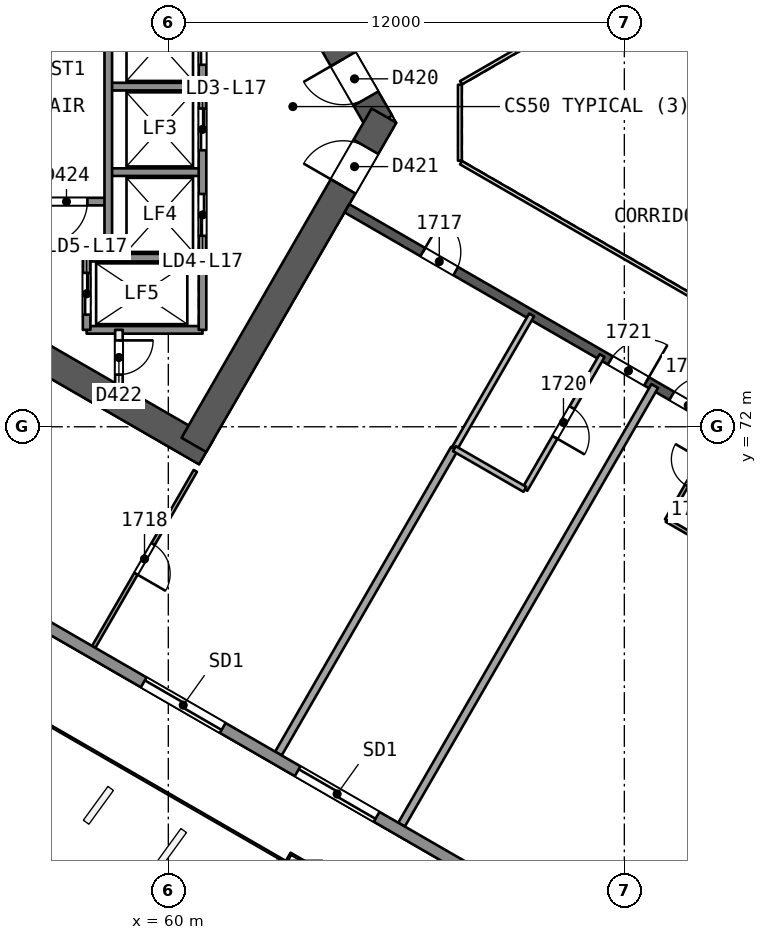
"""IFC4 building model, lengths in metres.
Left out: names, types, materials, properties, quantities, classifications, styles, units other than length and angle.
Written with IfcOpenShell. Run it as: python <this file> out.ifc"""

import sys

from ifc_helpers import new_model, si_unit, direction, frame, frame_2d, origin, origin_2d, place, context, subcontext, project, spatial, rectangle, extrude, element, fill, save


model = new_model("IFC4")
c1 = context("Model", 3, precision=1e-05, world=origin(), true_north=direction((0.0, 1.0)))
c2 = subcontext(c1, "Body", "Model", "MODEL_VIEW")
j1 = project(units=[si_unit("LENGTHUNIT", "METRE"), si_unit("PLANEANGLEUNIT", "RADIAN")], contexts=[c1])
p1 = place(None, origin())
s1 = spatial("IfcSite", under=j1, at=p1, CompositionType="ELEMENT")
p2 = place(p1, origin())
s2 = spatial("IfcBuilding", under=s1, at=p2, CompositionType="ELEMENT")
p3 = place(p2, frame((0.0, 0.0, 75.8)))
s3 = spatial("IfcBuildingStorey", under=s2, at=p3, CompositionType="ELEMENT", Elevation=75.8)
p4 = place(p3, frame((65.567, 80.0, 0.0), z_axis=(0.0, 0.0, 1.0), x_axis=(-0.499988615364, 0.866031976607, 0.0)))
e1 = element("IfcWall", 1, at=p4, inside=s3, PredefinedType="SHEAR", context=c2, shape_type="SweptSolid", body=[
    extrude(rectangle(XDim=10.163, YDim=0.75, at=frame_2d((5.082, 0.0))), origin(), (0.0, 0.0, 1.0), 3.7),
])
p5 = place(p4, frame((0.733, 0.0, 0.0)))
e2 = element("IfcOpeningElement", 2, at=p5, cuts=e1, PredefinedType="OPENING", context=c2, shape_type="SweptSolid", body=[
    extrude(rectangle(XDim=1.2, YDim=2.1, at=frame_2d((0.6, 1.05))), frame((0.0, 0.385, 0.0), z_axis=(0.0, -1.0, 0.0), x_axis=(1.0, 0.0, 0.0)), (0.0, 0.0, 1.0), 0.771),
])
p6 = place(p3, frame((60.673, 88.477, 0.0), z_axis=(0.0, 0.0, 1.0), x_axis=(-0.8660248072, -0.500001033313, 0.0)))
e3 = element("IfcWall", 3, at=p6, inside=s3, PredefinedType="SHEAR", context=c2, shape_type="SweptSolid", body=[
    extrude(rectangle(XDim=13.958, YDim=0.75, at=frame_2d((6.979, 0.0))), origin(), (0.0, 0.0, 1.0), 3.7),
])
p7 = place(p3, frame((48.772, 78.394, 0.0), z_axis=(0.0, 0.0, 1.0), x_axis=(0.866028339916, -0.499994914436, 0.0)))
e4 = element("IfcWall", 4, at=p7, inside=s3, PredefinedType="SHEAR", context=c2, shape_type="SweptSolid", body=[
    extrude(rectangle(XDim=14.117, YDim=0.75, at=frame_2d((7.059, 0.0))), origin(), (0.0, 0.0, 1.0), 3.7),
])
p8 = place(p3, frame((60.673, 71.523, 0.0), z_axis=(0.0, 0.0, 1.0), x_axis=(0.499997052475, 0.866027105532, 0.0)))
e5 = element("IfcWall", 5, at=p8, inside=s3, PredefinedType="SHEAR", context=c2, shape_type="SweptSolid", body=[
    extrude(rectangle(XDim=10.005, YDim=0.75, at=frame_2d((5.002, 0.0))), origin(), (0.0, 0.0, 1.0), 3.7),
])
p9 = place(p8, frame((7.855, 0.0, 0.0)))
e6 = element("IfcOpeningElement", 6, at=p9, cuts=e5, PredefinedType="OPENING", context=c2, shape_type="SweptSolid", body=[
    extrude(rectangle(XDim=1.2, YDim=2.1, at=frame_2d((0.6, 1.05))), frame((0.0, 0.385, 0.0), z_axis=(0.0, -1.0, 0.0), x_axis=(1.0, 0.0, 0.0)), (0.0, 0.0, 1.0), 0.771),
])
p10 = place(p3, frame((64.7, 77.748, 0.0), z_axis=(0.0, 0.0, 1.0), x_axis=(0.866026492143, -0.499998114903, 0.0)))
e7 = element("IfcWall", 7, at=p10, inside=s3, PredefinedType="SHEAR", context=c2, shape_type="SweptSolid", body=[
    extrude(rectangle(XDim=15.588, YDim=0.25, at=frame_2d((7.794, 0.0))), origin(), (0.0, 0.0, 1.0), 3.2),
])
p11 = place(p10, frame((2.306, 0.0, 0.0)))
e8 = element("IfcOpeningElement", 8, at=p11, cuts=e7, PredefinedType="OPENING", context=c2, shape_type="SweptSolid", body=[
    extrude(rectangle(XDim=1.0, YDim=2.1, at=frame_2d((0.5, 1.05))), frame((0.0, 0.135, 0.0), z_axis=(0.0, -1.0, 0.0), x_axis=(1.0, 0.0, 0.0)), (0.0, 0.0, 1.0), 0.271),
])
p12 = place(p10, frame((8.003, 0.0, 0.0)))
e9 = element("IfcOpeningElement", 9, at=p12, cuts=e7, PredefinedType="OPENING", context=c2, shape_type="SweptSolid", body=[
    extrude(rectangle(XDim=1.1, YDim=2.1, at=frame_2d((0.55, 1.05))), frame((0.0, 0.135, 0.0), z_axis=(0.0, -1.0, 0.0), x_axis=(1.0, 0.0, 0.0)), (0.0, 0.0, 1.0), 0.271),
])
p13 = place(p10, frame((9.871, 0.0, 0.0)))
e10 = element("IfcOpeningElement", 10, at=p13, cuts=e7, PredefinedType="OPENING", context=c2, shape_type="SweptSolid", body=[
    extrude(rectangle(XDim=1.0, YDim=2.1, at=frame_2d((0.5, 1.05))), frame((0.0, 0.135, 0.0), z_axis=(0.0, -1.0, 0.0), x_axis=(1.0, 0.0, 0.0)), (0.0, 0.0, 1.0), 0.271),
])
p14 = place(p3, frame((63.437, 59.973, 0.0), z_axis=(0.010093620709, 0.017482414954, 0.999796221231), x_axis=(-0.866025993948, 0.499998977805, 1.48331e-07)))
e11 = element("IfcColumn", 11, at=p14, inside=s3, PredefinedType="COLUMN", context=c2, shape_type="SweptSolid", body=[
    extrude(rectangle(XDim=1.1, YDim=1.1, at=origin_2d()), origin(), (0.0, 0.0, 1.0), 3.701),
])
p15 = place(p3, frame((60.71, 70.838, 0.0), z_axis=(0.0, 0.0, 1.0), x_axis=(-0.499974070055, -0.866040373927, 0.0)))
e12 = element("IfcWall", 12, at=p15, inside=s3, PredefinedType="PARTITIONING", context=c2, shape_type="SweptSolid", body=[
    extrude(rectangle(XDim=5.347, YDim=0.1, at=frame_2d((2.674, 0.0))), origin(), (0.0, 0.0, 1.0), 3.2),
])
p16 = place(p15, frame((2.224, 0.0, 0.0)))
e13 = element("IfcOpeningElement", 13, at=p16, cuts=e12, PredefinedType="OPENING", context=c2, shape_type="SweptSolid", body=[
    extrude(rectangle(XDim=0.9, YDim=2.1, at=frame_2d((0.45, 1.05))), frame((0.0, 0.061, 0.0), z_axis=(0.0, -1.0, 0.0), x_axis=(1.0, 0.0, 0.0)), (0.0, 0.0, 1.0), 0.121),
])
p17 = place(p3, frame((62.897, 63.401, 0.0), z_axis=(0.0, 0.0, 1.0), x_axis=(0.500016752221, 0.866015731669, 0.0)))
e14 = element("IfcWall", 14, at=p17, inside=s3, PredefinedType="PARTITIONING", context=c2, shape_type="SweptSolid", body=[
    extrude(rectangle(XDim=9.263, YDim=0.2, at=frame_2d((4.632, 0.0))), origin(), (0.0, 0.0, 1.0), 3.2),
])
p18 = place(p3, frame((67.529, 71.424, 0.0), z_axis=(0.0, 0.0, 1.0), x_axis=(0.499984252764, 0.866034495264, 0.0)))
e15 = element("IfcWall", 15, at=p18, inside=s3, PredefinedType="PARTITIONING", context=c2, shape_type="SweptSolid", body=[
    extrude(rectangle(XDim=4.063, YDim=0.15, at=frame_2d((2.032, 0.0))), origin(), (0.0, 0.0, 1.0), 3.2),
])
p19 = place(p3, frame((71.414, 73.872, 0.0), z_axis=(0.0, 0.0, 1.0), x_axis=(-0.499984252764, -0.866034495264, 0.0)))
e16 = element("IfcWall", 16, at=p19, inside=s3, PredefinedType="PARTITIONING", context=c2, shape_type="SweptSolid", body=[
    extrude(rectangle(XDim=4.063, YDim=0.15, at=frame_2d((2.032, 0.0))), origin(), (0.0, 0.0, 1.0), 3.2),
])
p20 = place(p19, frame((1.582, 0.0, 0.0)))
e17 = element("IfcOpeningElement", 17, at=p20, cuts=e16, PredefinedType="OPENING", context=c2, shape_type="SweptSolid", body=[
    extrude(rectangle(XDim=0.9, YDim=2.1, at=frame_2d((0.45, 1.05))), frame((0.0, 0.085, 0.0), z_axis=(0.0, -1.0, 0.0), x_axis=(1.0, 0.0, 0.0)), (0.0, 0.0, 1.0), 0.171),
])
p21 = place(p3, frame((69.383, 70.353, 0.0), z_axis=(0.0, 0.0, 1.0), x_axis=(-0.866024183959, 0.500002112793, 0.0)))
e18 = element("IfcWall", 18, at=p21, inside=s3, PredefinedType="PARTITIONING", context=c2, shape_type="SweptSolid", body=[
    extrude(rectangle(XDim=2.141, YDim=0.15, at=frame_2d((1.071, 0.0))), origin(), (0.0, 0.0, 1.0), 3.2),
])
p22 = place(p3, frame((66.137, 61.531, 0.0), z_axis=(0.0, 0.0, 1.0), x_axis=(0.500006843521, 0.86602145264, 0.0)))
e19 = element("IfcWall", 19, at=p22, inside=s3, PredefinedType="PARTITIONING", context=c2, shape_type="SweptSolid", body=[
    extrude(rectangle(XDim=13.326, YDim=0.2, at=frame_2d((6.663, 0.0))), origin(), (0.0, 0.0, 1.0), 3.2),
])
p23 = place(p3, frame((74.498, 68.743, 0.0), z_axis=(0.0, 0.0, 1.0), x_axis=(-0.865989903783, 0.500061482766, 0.0)))
e20 = element("IfcWall", 20, at=p23, inside=s3, PredefinedType="PARTITIONING", context=c2, shape_type="SweptSolid", body=[
    extrude(rectangle(XDim=1.6, YDim=0.1, at=frame_2d((0.8, 0.0))), origin(), (0.0, 0.0, 1.0), 3.2),
])
p24 = place(p3, frame((73.113, 69.543, 0.0), z_axis=(0.0, 0.0, 1.0), x_axis=(0.499987231761, 0.866032775405, 0.0)))
e21 = element("IfcWall", 21, at=p24, inside=s3, PredefinedType="PARTITIONING", context=c2, shape_type="SweptSolid", body=[
    extrude(rectangle(XDim=2.9, YDim=0.1, at=frame_2d((1.45, 0.0))), origin(), (0.0, 0.0, 1.0), 3.2),
])
p25 = place(p24, frame((1.05, 0.0, 0.0)))
e22 = element("IfcOpeningElement", 22, at=p25, cuts=e21, PredefinedType="OPENING", context=c2, shape_type="SweptSolid", body=[
    extrude(rectangle(XDim=0.8, YDim=2.1, at=frame_2d((0.4, 1.05))), frame((0.0, 0.061, 0.0), z_axis=(0.0, -1.0, 0.0), x_axis=(1.0, 0.0, 0.0)), (0.0, 0.0, 1.0), 0.121),
])
p26 = place(p3, frame((90.332, 47.39, 0.0), z_axis=(0.0, 0.0, 1.0), x_axis=(-0.866024586246, 0.500001416016, 0.0)))
e23 = element("IfcWall", 23, at=p26, inside=s3, PredefinedType="SOLIDWALL", context=c2, shape_type="SweptSolid", body=[
    extrude(rectangle(XDim=59.166, YDim=0.3, at=frame_2d((29.583, 0.0))), origin(), (0.0, 0.0, 1.0), 3.2),
])
p27 = place(p26, frame((28.695, 0.0, 0.0)))
e24 = element("IfcOpeningElement", 24, at=p27, cuts=e23, PredefinedType="OPENING", context=c2, shape_type="SweptSolid", body=[
    extrude(rectangle(XDim=2.4, YDim=2.4, at=frame_2d((1.2, 1.2))), frame((0.0, 0.161, 0.0), z_axis=(0.0, -1.0, 0.0), x_axis=(1.0, 0.0, 0.0)), (0.0, 0.0, 1.0), 0.321),
])
p28 = place(p26, frame((33.372, 0.0, 0.0)))
e25 = element("IfcOpeningElement", 25, at=p28, cuts=e23, PredefinedType="OPENING", context=c2, shape_type="SweptSolid", body=[
    extrude(rectangle(XDim=2.4, YDim=2.4, at=frame_2d((1.2, 1.2))), frame((0.0, 0.161, 0.0), z_axis=(0.0, -1.0, 0.0), x_axis=(1.0, 0.0, 0.0)), (0.0, 0.0, 1.0), 0.321),
])
p29 = place(p26, frame((45.903, 0.0, 0.0)))
e26 = element("IfcOpeningElement", 26, at=p29, cuts=e23, PredefinedType="OPENING", context=c2, shape_type="SweptSolid", body=[
    extrude(rectangle(XDim=2.4, YDim=2.4, at=frame_2d((1.2, 1.2))), frame((0.0, 0.161, 0.0), z_axis=(0.0, -1.0, 0.0), x_axis=(1.0, 0.0, 0.0)), (0.0, 0.0, 1.0), 0.321),
])
p30 = place(p26, frame((12.769, 0.0, 0.0)))
e27 = element("IfcOpeningElement", 27, at=p30, cuts=e23, PredefinedType="OPENING", context=c2, shape_type="SweptSolid", body=[
    extrude(rectangle(XDim=2.4, YDim=2.4, at=frame_2d((1.2, 1.2))), frame((0.0, 0.161, 0.0), z_axis=(0.0, -1.0, 0.0), x_axis=(1.0, 0.0, 0.0)), (0.0, 0.0, 1.0), 0.321),
])
for number, where, z_axis, x_axis in (
    (28, (60.9, 80.95, 0.0), (0.0, 0.0, 1.0), (-1.0, 0.0, 0.0)),
    (29, (60.9, 78.7, 0.0), (0.0, 0.0, 1.0), (-1.0, 0.0, 0.0)),
):
    element("IfcWall", number, at=place(p3, frame(where, z_axis=z_axis, x_axis=x_axis)), inside=s3, PredefinedType="SOLIDWALL", context=c2, shape_type="SweptSolid", body=[
        extrude(rectangle(XDim=2.48, YDim=0.2, at=frame_2d((1.24, 0.0))), origin(), (0.0, 0.0, 1.0), 3.2),
    ])
p31 = place(p3, frame((58.42, 77.925, 0.0), z_axis=(0.0, 0.0, 1.0), x_axis=(-1.0, 0.0, 0.0)))
e30 = element("IfcWall", 30, at=p31, inside=s3, PredefinedType="SOLIDWALL", context=c2, shape_type="SweptSolid", body=[
    extrude(rectangle(XDim=7.7, YDim=0.2, at=frame_2d((3.85, 0.0))), origin(), (0.0, 0.0, 1.0), 3.2),
])
p32 = place(p31, frame((0.55, 0.0, 0.0)))
e31 = element("IfcOpeningElement", 31, at=p32, cuts=e30, PredefinedType="OPENING", context=c2, shape_type="SweptSolid", body=[
    extrude(rectangle(XDim=1.1, YDim=2.1, at=frame_2d((0.55, 1.05))), frame((0.0, 0.11, 0.0), z_axis=(0.0, -1.0, 0.0), x_axis=(1.0, 0.0, 0.0)), (0.0, 0.0, 1.0), 0.221),
])
for number, where, z_axis, x_axis in (
    (32, (60.9, 76.45, 0.0), (0.0, 0.0, 1.0), (-1.0, 0.0, 0.0)),
    (33, (60.9, 74.55, 0.0), (0.0, 0.0, 1.0), (-1.0, 0.0, 0.0)),
):
    element("IfcWall", number, at=place(p3, frame(where, z_axis=z_axis, x_axis=x_axis)), inside=s3, PredefinedType="SOLIDWALL", context=c2, shape_type="SweptSolid", body=[
        extrude(rectangle(XDim=3.05, YDim=0.2, at=frame_2d((1.525, 0.0))), origin(), (0.0, 0.0, 1.0), 3.2),
    ])
p33 = place(p3, frame((60.9, 85.45, 0.0), z_axis=(0.0, 0.0, 1.0), x_axis=(0.0, -1.0, 0.0)))
e34 = element("IfcWall", 34, at=p33, inside=s3, PredefinedType="SOLIDWALL", context=c2, shape_type="SweptSolid", body=[
    extrude(rectangle(XDim=10.9, YDim=0.2, at=frame_2d((5.45, 0.0))), origin(), (0.0, 0.0, 1.0), 3.2),
])
p34 = place(p33, frame((0.575, 0.0, 0.0)))
e35 = element("IfcOpeningElement", 35, at=p34, cuts=e34, PredefinedType="OPENING", context=c2, shape_type="SweptSolid", body=[
    extrude(rectangle(XDim=1.1, YDim=2.1, at=frame_2d((0.55, 1.05))), frame((0.0, 0.11, 0.0), z_axis=(0.0, -1.0, 0.0), x_axis=(1.0, 0.0, 0.0)), (0.0, 0.0, 1.0), 0.221),
])
p35 = place(p33, frame((2.825, 0.0, 0.0)))
e36 = element("IfcOpeningElement", 36, at=p35, cuts=e34, PredefinedType="OPENING", context=c2, shape_type="SweptSolid", body=[
    extrude(rectangle(XDim=1.1, YDim=2.1, at=frame_2d((0.55, 1.05))), frame((0.0, 0.11, 0.0), z_axis=(0.0, -1.0, 0.0), x_axis=(1.0, 0.0, 0.0)), (0.0, 0.0, 1.0), 0.221),
])
p36 = place(p33, frame((5.075, 0.0, 0.0)))
e37 = element("IfcOpeningElement", 37, at=p36, cuts=e34, PredefinedType="OPENING", context=c2, shape_type="SweptSolid", body=[
    extrude(rectangle(XDim=1.1, YDim=2.1, at=frame_2d((0.55, 1.05))), frame((0.0, 0.11, 0.0), z_axis=(0.0, -1.0, 0.0), x_axis=(1.0, 0.0, 0.0)), (0.0, 0.0, 1.0), 0.221),
])
p37 = place(p33, frame((7.325, 0.0, 0.0)))
e38 = element("IfcOpeningElement", 38, at=p37, cuts=e34, PredefinedType="OPENING", context=c2, shape_type="SweptSolid", body=[
    extrude(rectangle(XDim=1.1, YDim=2.1, at=frame_2d((0.55, 1.05))), frame((0.0, 0.11, 0.0), z_axis=(0.0, -1.0, 0.0), x_axis=(1.0, 0.0, 0.0)), (0.0, 0.0, 1.0), 0.221),
])
p38 = place(p3, frame((58.7, 74.55, 0.0), z_axis=(0.0, 0.0, 1.0), x_axis=(0.0, -1.0, 0.0)))
e39 = element("IfcWall", 39, at=p38, inside=s3, PredefinedType="PARTITIONING", context=c2, shape_type="SweptSolid", body=[
    extrude(rectangle(XDim=1.455, YDim=0.2, at=frame_2d((0.728, 0.0))), origin(), (0.0, 0.0, 1.0), 3.2),
])
p39 = place(p38, frame((0.278, 0.0, 0.0)))
e40 = element("IfcOpeningElement", 40, at=p39, cuts=e39, PredefinedType="OPENING", context=c2, shape_type="SweptSolid", body=[
    extrude(rectangle(XDim=0.9, YDim=2.1, at=frame_2d((0.45, 1.05))), frame((0.0, 0.11, 0.0), z_axis=(0.0, -1.0, 0.0), x_axis=(1.0, 0.0, 0.0)), (0.0, 0.0, 1.0), 0.221),
])
p40 = place(p3, frame((58.42, 85.45, 0.0), z_axis=(0.0, 0.0, 1.0), x_axis=(0.0, -1.0, 0.0)))
e41 = element("IfcWall", 41, at=p40, inside=s3, PredefinedType="SOLIDWALL", context=c2, shape_type="SweptSolid", body=[
    extrude(rectangle(XDim=9.0, YDim=0.2, at=frame_2d((4.5, 0.0))), origin(), (0.0, 0.0, 1.0), 3.2),
])
p41 = place(p3, frame((57.85, 76.45, 0.0), z_axis=(0.0, 0.0, 1.0), x_axis=(0.0, -1.0, 0.0)))
e42 = element("IfcWall", 42, at=p41, inside=s3, PredefinedType="SOLIDWALL", context=c2, shape_type="SweptSolid", body=[
    extrude(rectangle(XDim=1.9, YDim=0.2, at=frame_2d((0.95, 0.0))), origin(), (0.0, 0.0, 1.0), 3.2),
])
p42 = place(p41, frame((0.4, 0.0, 0.0)))
e43 = element("IfcOpeningElement", 43, at=p42, cuts=e42, PredefinedType="OPENING", context=c2, shape_type="SweptSolid", body=[
    extrude(rectangle(XDim=1.1, YDim=2.1, at=frame_2d((0.55, 1.05))), frame((0.0, 0.11, 0.0), z_axis=(0.0, -1.0, 0.0), x_axis=(1.0, 0.0, 0.0)), (0.0, 0.0, 1.0), 0.221),
])
p43 = place(p3, frame((77.738, 86.846, 0.0), z_axis=(0.0, 0.0, 1.0), x_axis=(-0.866026658274, -0.499997827154, 0.0)))
e44 = element("IfcWall", 44, at=p43, inside=s3, PredefinedType="PARTITIONING", context=c2, shape_type="SweptSolid", body=[
    extrude(rectangle(XDim=11.588, YDim=0.1, at=frame_2d((5.794, 0.0))), origin(), (0.0, 0.0, 1.0), 3.2),
])
p44 = place(p3, frame((67.672, 81.0, 0.0), z_axis=(0.0, 0.0, 1.0), x_axis=(0.0, -1.0, 0.0)))
e45 = element("IfcWall", 45, at=p44, inside=s3, PredefinedType="PARTITIONING", context=c2, shape_type="SweptSolid", body=[
    extrude(rectangle(XDim=2.0, YDim=0.1, at=frame_2d((1.0, 0.0))), origin(), (0.0, 0.0, 1.0), 3.2),
])
p45 = place(p3, frame((67.702, 78.948, 0.0), z_axis=(0.0, 0.0, 1.0), x_axis=(0.866026658274, -0.499997827154, 0.0)))
e46 = element("IfcWall", 46, at=p45, inside=s3, PredefinedType="PARTITIONING", context=c2, shape_type="SweptSolid", body=[
    extrude(rectangle(XDim=11.588, YDim=0.1, at=frame_2d((5.794, 0.0))), origin(), (0.0, 0.0, 1.0), 3.2),
])
p46 = place(p11, origin())
e47 = element("IfcDoor", 47, at=p46, inside=s3, OperationType="SINGLE_SWING_LEFT", PredefinedType="NOTDEFINED", context=c2, shape_type="SweptSolid", body=[
    extrude(rectangle(XDim=1.0, YDim=2.1, at=frame_2d((0.5, 1.05))), frame((0.0, 0.025, 0.0), z_axis=(0.0, -1.0, 0.0), x_axis=(1.0, 0.0, 0.0)), (0.0, 0.0, 1.0), 0.05),
])
fill(e8, e47)
p47 = place(p16, origin())
e48 = element("IfcDoor", 48, at=p47, inside=s3, OperationType="SINGLE_SWING_RIGHT", PredefinedType="NOTDEFINED", context=c2, shape_type="SweptSolid", body=[
    extrude(rectangle(XDim=0.9, YDim=2.1, at=frame_2d((0.45, 1.05))), frame((0.0, 0.025, 0.0), z_axis=(0.0, -1.0, 0.0), x_axis=(1.0, 0.0, 0.0)), (0.0, 0.0, 1.0), 0.05),
])
fill(e13, e48)
p48 = place(p20, origin())
e49 = element("IfcDoor", 49, at=p48, inside=s3, OperationType="SINGLE_SWING_RIGHT", PredefinedType="NOTDEFINED", context=c2, shape_type="SweptSolid", body=[
    extrude(rectangle(XDim=0.9, YDim=2.1, at=frame_2d((0.45, 1.05))), frame((0.0, 0.025, 0.0), z_axis=(0.0, -1.0, 0.0), x_axis=(1.0, 0.0, 0.0)), (0.0, 0.0, 1.0), 0.05),
])
fill(e17, e49)
p49 = place(p12, origin())
e50 = element("IfcDoor", 50, at=p49, inside=s3, OperationType="SINGLE_SWING_RIGHT", PredefinedType="NOTDEFINED", context=c2, shape_type="SweptSolid", body=[
    extrude(rectangle(XDim=1.1, YDim=2.1, at=frame_2d((0.55, 1.05))), frame((0.0, 0.025, 0.0), z_axis=(0.0, -1.0, 0.0), x_axis=(1.0, 0.0, 0.0)), (0.0, 0.0, 1.0), 0.05),
])
fill(e9, e50)
p50 = place(p25, origin())
e51 = element("IfcDoor", 51, at=p50, inside=s3, OperationType="SINGLE_SWING_RIGHT", PredefinedType="NOTDEFINED", context=c2, shape_type="SweptSolid", body=[
    extrude(rectangle(XDim=0.8, YDim=2.1, at=frame_2d((0.4, 1.05))), frame((0.0, 0.025, 0.0), z_axis=(0.0, -1.0, 0.0), x_axis=(1.0, 0.0, 0.0)), (0.0, 0.0, 1.0), 0.05),
])
fill(e22, e51)
p51 = place(p13, origin())
e52 = element("IfcDoor", 52, at=p51, inside=s3, OperationType="SINGLE_SWING_RIGHT", PredefinedType="NOTDEFINED", context=c2, shape_type="SweptSolid", body=[
    extrude(rectangle(XDim=1.0, YDim=2.1, at=frame_2d((0.5, 1.05))), frame((0.0, 0.025, 0.0), z_axis=(0.0, -1.0, 0.0), x_axis=(1.0, 0.0, 0.0)), (0.0, 0.0, 1.0), 0.05),
])
fill(e10, e52)
p52 = place(p27, origin())
e53 = element("IfcDoor", 53, at=p52, inside=s3, OperationType="SLIDING_TO_LEFT", PredefinedType="NOTDEFINED", context=c2, shape_type="SweptSolid", body=[
    extrude(rectangle(XDim=2.4, YDim=2.4, at=frame_2d((1.2, 1.2))), frame((0.0, 0.025, 0.0), z_axis=(0.0, -1.0, 0.0), x_axis=(1.0, 0.0, 0.0)), (0.0, 0.0, 1.0), 0.05),
])
fill(e24, e53)
p53 = place(p28, origin())
e54 = element("IfcDoor", 54, at=p53, inside=s3, OperationType="SLIDING_TO_RIGHT", PredefinedType="NOTDEFINED", context=c2, shape_type="SweptSolid", body=[
    extrude(rectangle(XDim=2.4, YDim=2.4, at=frame_2d((1.2, 1.2))), frame((0.0, 0.025, 0.0), z_axis=(0.0, -1.0, 0.0), x_axis=(1.0, 0.0, 0.0)), (0.0, 0.0, 1.0), 0.05),
])
fill(e25, e54)
p54 = place(p5, origin())
e55 = element("IfcDoor", 55, at=p54, inside=s3, OperationType="SINGLE_SWING_RIGHT", PredefinedType="NOTDEFINED", context=c2, shape_type="SweptSolid", body=[
    extrude(rectangle(XDim=1.2, YDim=2.1, at=frame_2d((0.6, 1.05))), frame((0.0, 0.025, 0.0), z_axis=(0.0, -1.0, 0.0), x_axis=(1.0, 0.0, 0.0)), (0.0, 0.0, 1.0), 0.05),
])
fill(e2, e55)
p55 = place(p9, origin())
e56 = element("IfcDoor", 56, at=p55, inside=s3, OperationType="SINGLE_SWING_LEFT", PredefinedType="NOTDEFINED", context=c2, shape_type="SweptSolid", body=[
    extrude(rectangle(XDim=1.2, YDim=2.1, at=frame_2d((0.6, 1.05))), frame((0.0, 0.025, 0.0), z_axis=(0.0, -1.0, 0.0), x_axis=(1.0, 0.0, 0.0)), (0.0, 0.0, 1.0), 0.05),
])
fill(e6, e56)
p56 = place(p35, origin())
e57 = element("IfcDoor", 57, at=p56, inside=s3, OperationType="SLIDING_TO_LEFT", PredefinedType="NOTDEFINED", context=c2, shape_type="SweptSolid", body=[
    extrude(rectangle(XDim=1.1, YDim=2.1, at=frame_2d((0.55, 1.05))), frame((0.0, 0.025, 0.0), z_axis=(0.0, -1.0, 0.0), x_axis=(1.0, 0.0, 0.0)), (0.0, 0.0, 1.0), 0.05),
])
fill(e36, e57)
p57 = place(p36, origin())
e58 = element("IfcDoor", 58, at=p57, inside=s3, OperationType="SLIDING_TO_RIGHT", PredefinedType="NOTDEFINED", context=c2, shape_type="SweptSolid", body=[
    extrude(rectangle(XDim=1.1, YDim=2.1, at=frame_2d((0.55, 1.05))), frame((0.0, 0.025, 0.0), z_axis=(0.0, -1.0, 0.0), x_axis=(1.0, 0.0, 0.0)), (0.0, 0.0, 1.0), 0.05),
])
fill(e37, e58)
p58 = place(p37, origin())
e59 = element("IfcDoor", 59, at=p58, inside=s3, OperationType="SLIDING_TO_LEFT", PredefinedType="NOTDEFINED", context=c2, shape_type="SweptSolid", body=[
    extrude(rectangle(XDim=1.1, YDim=2.1, at=frame_2d((0.55, 1.05))), frame((0.0, 0.025, 0.0), z_axis=(0.0, -1.0, 0.0), x_axis=(1.0, 0.0, 0.0)), (0.0, 0.0, 1.0), 0.05),
])
fill(e38, e59)
p59 = place(p42, origin())
e60 = element("IfcDoor", 60, at=p59, inside=s3, OperationType="SLIDING_TO_RIGHT", PredefinedType="NOTDEFINED", context=c2, shape_type="SweptSolid", body=[
    extrude(rectangle(XDim=1.1, YDim=2.1, at=frame_2d((0.55, 1.05))), frame((0.0, 0.025, 0.0), z_axis=(0.0, -1.0, 0.0), x_axis=(1.0, 0.0, 0.0)), (0.0, 0.0, 1.0), 0.05),
])
fill(e43, e60)
p60 = place(p39, origin())
e61 = element("IfcDoor", 61, at=p60, inside=s3, OperationType="SINGLE_SWING_LEFT", PredefinedType="NOTDEFINED", context=c2, shape_type="SweptSolid", body=[
    extrude(rectangle(XDim=0.9, YDim=2.1, at=frame_2d((0.45, 1.05))), frame((0.0, 0.025, 0.0), z_axis=(0.0, -1.0, 0.0), x_axis=(1.0, 0.0, 0.0)), (0.0, 0.0, 1.0), 0.05),
])
fill(e40, e61)
p61 = place(p32, origin())
e62 = element("IfcDoor", 62, at=p61, inside=s3, OperationType="SINGLE_SWING_RIGHT", PredefinedType="NOTDEFINED", context=c2, shape_type="SweptSolid", body=[
    extrude(rectangle(XDim=1.1, YDim=2.1, at=frame_2d((0.55, 1.05))), frame((0.0, 0.025, 0.0), z_axis=(0.0, -1.0, 0.0), x_axis=(1.0, 0.0, 0.0)), (0.0, 0.0, 1.0), 0.05),
])
fill(e31, e62)
save(model, sys.argv[1])
